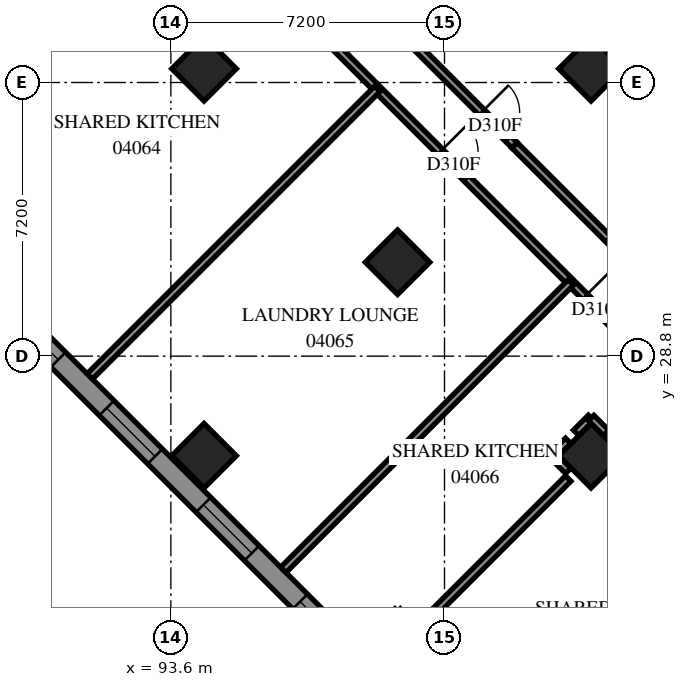
"""IFC4 building model, lengths in metres.
Left out: names, types, materials, properties, quantities, classifications, styles, units other than length and angle.
Written with IfcOpenShell. Run it as: python <this file> out.ifc"""

import sys

from ifc_helpers import new_model, si_unit, direction, frame, frame_2d, origin, origin_2d, place, context, subcontext, project, spatial, polyline, rectangle, outline, extrude, element, fill, save


model = new_model("IFC4")
c1 = context("Model", 3, precision=1e-05, world=origin(), true_north=direction((0.0, 1.0)))
c2 = subcontext(c1, "Body", "Model", "MODEL_VIEW")
j1 = project(units=[si_unit("LENGTHUNIT", "METRE"), si_unit("PLANEANGLEUNIT", "RADIAN")], contexts=[c1])
p1 = place(None, origin())
s1 = spatial("IfcSite", under=j1, at=p1, CompositionType="ELEMENT")
p2 = place(p1, origin())
s2 = spatial("IfcBuilding", under=s1, at=p2, CompositionType="ELEMENT")
p3 = place(p2, frame((0.0, 0.0, 18.6)))
s3 = spatial("IfcBuildingStorey", under=s2, at=p3, CompositionType="ELEMENT", Elevation=18.6)
for number, where, z_axis, x_axis in (
    (1, (94.474, 36.362, 0.0), (0.0, 0.0, 1.0), (0.707, -0.707, 0.0)),
    (2, (104.656, 36.362, 0.0), (0.0, 0.0, 1.0), (0.707, -0.707, 0.0)),
    (3, (99.565, 31.271, 0.0), (0.0, 0.0, 1.0), (0.707, -0.707, 0.0)),
    (4, (94.474, 26.18, 0.0), (0.0, 0.0, 1.0), (0.707, -0.707, 0.0)),
    (5, (104.656, 26.18, 0.0), (0.0, 0.0, 1.0), (0.707, -0.707, 0.0)),
):
    element("IfcColumn", number, at=place(p3, frame(where, z_axis=z_axis, x_axis=x_axis)), inside=s3, PredefinedType="COLUMN", context=c2, shape_type="SweptSolid", body=[
        extrude(rectangle(XDim=1.2, YDim=1.2, at=origin_2d()), origin(), (0.0, 0.0, 1.0), 3.8),
    ])
p4 = place(p3, frame((104.656, 14.689, 0.0), z_axis=(0.0, 0.0, 1.0), x_axis=(0.7071094621, 0.7071041002, 0.0)))
e6 = element("IfcWall", 6, at=p4, inside=s3, PredefinedType="SOLIDWALL", context=c2, shape_type="SweptSolid", body=[
    extrude(outline(polyline([(-0.275, -0.275), (18.925, -0.275), (18.375, 0.275), (0.275, 0.275), (-0.275, -0.275)])), origin(), (0.0, 0.0, 1.0), 3.8),
])
p5 = place(p4, frame((1.825, 0.0, 0.7)))
e7 = element("IfcOpeningElement", 7, at=p5, cuts=e6, PredefinedType="OPENING", context=c2, shape_type="SweptSolid", body=[
    extrude(rectangle(XDim=1.8, YDim=2.4, at=frame_2d((0.9, 1.2))), frame((0.0, 0.285, 0.0), z_axis=(0.0, -1.0, 0.0), x_axis=(1.0, 0.0, 0.0)), (0.0, 0.0, 1.0), 0.57),
])
p6 = place(p4, frame((5.425, 0.0, 0.7)))
e8 = element("IfcOpeningElement", 8, at=p6, cuts=e6, PredefinedType="OPENING", context=c2, shape_type="SweptSolid", body=[
    extrude(rectangle(XDim=1.8, YDim=2.4, at=frame_2d((0.9, 1.2))), frame((0.0, 0.285, 0.0), z_axis=(0.0, -1.0, 0.0), x_axis=(1.0, 0.0, 0.0)), (0.0, 0.0, 1.0), 0.57),
])
p7 = place(p4, frame((9.025, 0.0, 0.7)))
e9 = element("IfcOpeningElement", 9, at=p7, cuts=e6, PredefinedType="OPENING", context=c2, shape_type="SweptSolid", body=[
    extrude(rectangle(XDim=1.8, YDim=2.4, at=frame_2d((0.9, 1.2))), frame((0.0, 0.285, 0.0), z_axis=(0.0, -1.0, 0.0), x_axis=(1.0, 0.0, 0.0)), (0.0, 0.0, 1.0), 0.57),
])
p8 = place(p4, frame((12.625, 0.0, 0.7)))
e10 = element("IfcOpeningElement", 10, at=p8, cuts=e6, PredefinedType="OPENING", context=c2, shape_type="SweptSolid", body=[
    extrude(rectangle(XDim=1.8, YDim=2.4, at=frame_2d((0.9, 1.2))), frame((0.0, 0.285, 0.0), z_axis=(0.0, -1.0, 0.0), x_axis=(1.0, 0.0, 0.0)), (0.0, 0.0, 1.0), 0.57),
])
p9 = place(p4, frame((16.05, 0.0, 0.7)))
e11 = element("IfcOpeningElement", 11, at=p9, cuts=e6, PredefinedType="OPENING", context=c2, shape_type="SweptSolid", body=[
    extrude(rectangle(XDim=1.8, YDim=2.4, at=frame_2d((0.9, 1.2))), frame((0.0, 0.285, 0.0), z_axis=(0.0, -1.0, 0.0), x_axis=(1.0, 0.0, 0.0)), (0.0, 0.0, 1.0), 0.57),
])
p10 = place(p3, frame((117.843, 34.665, 0.0), z_axis=(0.0, 0.0, 1.0), x_axis=(-0.7071067812, 0.7071067812, 0.0)))
e12 = element("IfcWall", 12, at=p10, inside=s3, PredefinedType="SOLIDWALL", context=c2, shape_type="SweptSolid", body=[
    extrude(outline(polyline([(-0.275, -0.275), (54.222, -0.275), (53.994, 0.275), (0.275, 0.275), (-0.275, -0.275)])), origin(), (0.0, 0.0, 1.0), 3.8),
])
p11 = place(p10, frame((0.8, 0.0, 0.7)))
e13 = element("IfcOpeningElement", 13, at=p11, cuts=e12, PredefinedType="OPENING", context=c2, shape_type="SweptSolid", body=[
    extrude(rectangle(XDim=1.8, YDim=2.4, at=frame_2d((0.9, 1.2))), frame((0.0, 0.285, 0.0), z_axis=(0.0, -1.0, 0.0), x_axis=(1.0, 0.0, 0.0)), (0.0, 0.0, 1.0), 0.57),
])
p12 = place(p10, frame((4.225, 0.0, 0.7)))
e14 = element("IfcOpeningElement", 14, at=p12, cuts=e12, PredefinedType="OPENING", context=c2, shape_type="SweptSolid", body=[
    extrude(rectangle(XDim=1.8, YDim=2.4, at=frame_2d((0.9, 1.2))), frame((0.0, 0.285, 0.0), z_axis=(0.0, -1.0, 0.0), x_axis=(1.0, 0.0, 0.0)), (0.0, 0.0, 1.0), 0.57),
])
p13 = place(p10, frame((7.825, 0.0, 0.7)))
e15 = element("IfcOpeningElement", 15, at=p13, cuts=e12, PredefinedType="OPENING", context=c2, shape_type="SweptSolid", body=[
    extrude(rectangle(XDim=1.8, YDim=2.4, at=frame_2d((0.9, 1.2))), frame((0.0, 0.285, 0.0), z_axis=(0.0, -1.0, 0.0), x_axis=(1.0, 0.0, 0.0)), (0.0, 0.0, 1.0), 0.57),
])
p14 = place(p10, frame((11.425, 0.0, 0.7)))
e16 = element("IfcOpeningElement", 16, at=p14, cuts=e12, PredefinedType="OPENING", context=c2, shape_type="SweptSolid", body=[
    extrude(rectangle(XDim=1.8, YDim=2.4, at=frame_2d((0.9, 1.2))), frame((0.0, 0.285, 0.0), z_axis=(0.0, -1.0, 0.0), x_axis=(1.0, 0.0, 0.0)), (0.0, 0.0, 1.0), 0.57),
])
p15 = place(p10, frame((15.025, 0.0, 0.7)))
e17 = element("IfcOpeningElement", 17, at=p15, cuts=e12, PredefinedType="OPENING", context=c2, shape_type="SweptSolid", body=[
    extrude(rectangle(XDim=1.8, YDim=2.4, at=frame_2d((0.9, 1.2))), frame((0.0, 0.285, 0.0), z_axis=(0.0, -1.0, 0.0), x_axis=(1.0, 0.0, 0.0)), (0.0, 0.0, 1.0), 0.57),
])
p16 = place(p10, frame((18.625, 0.0, 0.7)))
e18 = element("IfcOpeningElement", 18, at=p16, cuts=e12, PredefinedType="OPENING", context=c2, shape_type="SweptSolid", body=[
    extrude(rectangle(XDim=1.8, YDim=2.4, at=frame_2d((0.9, 1.2))), frame((0.0, 0.285, 0.0), z_axis=(0.0, -1.0, 0.0), x_axis=(1.0, 0.0, 0.0)), (0.0, 0.0, 1.0), 0.57),
])
p17 = place(p10, frame((22.225, 0.0, 0.7)))
e19 = element("IfcOpeningElement", 19, at=p17, cuts=e12, PredefinedType="OPENING", context=c2, shape_type="SweptSolid", body=[
    extrude(rectangle(XDim=1.8, YDim=2.4, at=frame_2d((0.9, 1.2))), frame((0.0, 0.285, 0.0), z_axis=(0.0, -1.0, 0.0), x_axis=(1.0, 0.0, 0.0)), (0.0, 0.0, 1.0), 0.57),
])
p18 = place(p10, frame((25.825, 0.0, 0.7)))
e20 = element("IfcOpeningElement", 20, at=p18, cuts=e12, PredefinedType="OPENING", context=c2, shape_type="SweptSolid", body=[
    extrude(rectangle(XDim=1.8, YDim=2.4, at=frame_2d((0.9, 1.2))), frame((0.0, 0.285, 0.0), z_axis=(0.0, -1.0, 0.0), x_axis=(1.0, 0.0, 0.0)), (0.0, 0.0, 1.0), 0.57),
])
p19 = place(p10, frame((29.425, 0.0, 0.7)))
e21 = element("IfcOpeningElement", 21, at=p19, cuts=e12, PredefinedType="OPENING", context=c2, shape_type="SweptSolid", body=[
    extrude(rectangle(XDim=1.8, YDim=2.4, at=frame_2d((0.9, 1.2))), frame((0.0, 0.285, 0.0), z_axis=(0.0, -1.0, 0.0), x_axis=(1.0, 0.0, 0.0)), (0.0, 0.0, 1.0), 0.57),
])
p20 = place(p10, frame((33.025, 0.0, 0.7)))
e22 = element("IfcOpeningElement", 22, at=p20, cuts=e12, PredefinedType="OPENING", context=c2, shape_type="SweptSolid", body=[
    extrude(rectangle(XDim=1.8, YDim=2.4, at=frame_2d((0.9, 1.2))), frame((0.0, 0.285, 0.0), z_axis=(0.0, -1.0, 0.0), x_axis=(1.0, 0.0, 0.0)), (0.0, 0.0, 1.0), 0.57),
])
p21 = place(p10, frame((36.625, 0.0, 0.7)))
e23 = element("IfcOpeningElement", 23, at=p21, cuts=e12, PredefinedType="OPENING", context=c2, shape_type="SweptSolid", body=[
    extrude(rectangle(XDim=1.8, YDim=2.4, at=frame_2d((0.9, 1.2))), frame((0.0, 0.285, 0.0), z_axis=(0.0, -1.0, 0.0), x_axis=(1.0, 0.0, 0.0)), (0.0, 0.0, 1.0), 0.57),
])
p22 = place(p10, frame((40.225, 0.0, 0.7)))
e24 = element("IfcOpeningElement", 24, at=p22, cuts=e12, PredefinedType="OPENING", context=c2, shape_type="SweptSolid", body=[
    extrude(rectangle(XDim=1.8, YDim=2.4, at=frame_2d((0.9, 1.2))), frame((0.0, 0.285, 0.0), z_axis=(0.0, -1.0, 0.0), x_axis=(1.0, 0.0, 0.0)), (0.0, 0.0, 1.0), 0.57),
])
p23 = place(p10, frame((43.825, 0.0, 0.7)))
e25 = element("IfcOpeningElement", 25, at=p23, cuts=e12, PredefinedType="OPENING", context=c2, shape_type="SweptSolid", body=[
    extrude(rectangle(XDim=1.8, YDim=2.4, at=frame_2d((0.9, 1.2))), frame((0.0, 0.285, 0.0), z_axis=(0.0, -1.0, 0.0), x_axis=(1.0, 0.0, 0.0)), (0.0, 0.0, 1.0), 0.57),
])
p24 = place(p10, frame((47.425, 0.0, 0.7)))
e26 = element("IfcOpeningElement", 26, at=p24, cuts=e12, PredefinedType="OPENING", context=c2, shape_type="SweptSolid", body=[
    extrude(rectangle(XDim=1.8, YDim=2.4, at=frame_2d((0.9, 1.2))), frame((0.0, 0.285, 0.0), z_axis=(0.0, -1.0, 0.0), x_axis=(1.0, 0.0, 0.0)), (0.0, 0.0, 1.0), 0.57),
])
p25 = place(p10, frame((51.06, 0.0, 0.7)))
e27 = element("IfcOpeningElement", 27, at=p25, cuts=e12, PredefinedType="OPENING", context=c2, shape_type="SweptSolid", body=[
    extrude(rectangle(XDim=1.8, YDim=2.4, at=frame_2d((0.9, 1.2))), frame((0.0, 0.285, 0.0), z_axis=(0.0, -1.0, 0.0), x_axis=(1.0, 0.0, 0.0)), (0.0, 0.0, 1.0), 0.57),
])
p26 = place(p3, frame((77.07, 42.275, 0.0), z_axis=(0.0, 0.0, 1.0), x_axis=(0.7071067812, -0.7071067812, 0.0)))
e28 = element("IfcWall", 28, at=p26, inside=s3, PredefinedType="SOLIDWALL", context=c2, shape_type="SweptSolid", body=[
    extrude(outline(polyline([(0.114, -0.275), (39.288, -0.275), (38.737, 0.275), (-0.114, 0.275), (0.114, -0.275)])), origin(), (0.0, 0.0, 1.0), 3.8),
])
p27 = place(p26, frame((2.837, 0.0, 0.7)))
e29 = element("IfcOpeningElement", 29, at=p27, cuts=e28, PredefinedType="OPENING", context=c2, shape_type="SweptSolid", body=[
    extrude(rectangle(XDim=1.8, YDim=2.4, at=frame_2d((0.9, 1.2))), frame((0.0, 0.285, 0.0), z_axis=(0.0, -1.0, 0.0), x_axis=(1.0, 0.0, 0.0)), (0.0, 0.0, 1.0), 0.57),
])
p28 = place(p26, frame((6.588, 0.0, 0.7)))
e30 = element("IfcOpeningElement", 30, at=p28, cuts=e28, PredefinedType="OPENING", context=c2, shape_type="SweptSolid", body=[
    extrude(rectangle(XDim=1.8, YDim=2.4, at=frame_2d((0.9, 1.2))), frame((0.0, 0.285, 0.0), z_axis=(0.0, -1.0, 0.0), x_axis=(1.0, 0.0, 0.0)), (0.0, 0.0, 1.0), 0.57),
])
p29 = place(p26, frame((10.188, 0.0, 0.7)))
e31 = element("IfcOpeningElement", 31, at=p29, cuts=e28, PredefinedType="OPENING", context=c2, shape_type="SweptSolid", body=[
    extrude(rectangle(XDim=1.8, YDim=2.4, at=frame_2d((0.9, 1.2))), frame((0.0, 0.285, 0.0), z_axis=(0.0, -1.0, 0.0), x_axis=(1.0, 0.0, 0.0)), (0.0, 0.0, 1.0), 0.57),
])
p30 = place(p26, frame((13.787, 0.0, 0.7)))
e32 = element("IfcOpeningElement", 32, at=p30, cuts=e28, PredefinedType="OPENING", context=c2, shape_type="SweptSolid", body=[
    extrude(rectangle(XDim=1.8, YDim=2.4, at=frame_2d((0.9, 1.2))), frame((0.0, 0.285, 0.0), z_axis=(0.0, -1.0, 0.0), x_axis=(1.0, 0.0, 0.0)), (0.0, 0.0, 1.0), 0.57),
])
p31 = place(p26, frame((17.387, 0.0, 0.7)))
e33 = element("IfcOpeningElement", 33, at=p31, cuts=e28, PredefinedType="OPENING", context=c2, shape_type="SweptSolid", body=[
    extrude(rectangle(XDim=1.8, YDim=2.4, at=frame_2d((0.9, 1.2))), frame((0.0, 0.285, 0.0), z_axis=(0.0, -1.0, 0.0), x_axis=(1.0, 0.0, 0.0)), (0.0, 0.0, 1.0), 0.57),
])
p32 = place(p26, frame((20.988, 0.0, 0.7)))
e34 = element("IfcOpeningElement", 34, at=p32, cuts=e28, PredefinedType="OPENING", context=c2, shape_type="SweptSolid", body=[
    extrude(rectangle(XDim=1.8, YDim=2.4, at=frame_2d((0.9, 1.2))), frame((0.0, 0.285, 0.0), z_axis=(0.0, -1.0, 0.0), x_axis=(1.0, 0.0, 0.0)), (0.0, 0.0, 1.0), 0.57),
])
p33 = place(p26, frame((24.587, 0.0, 0.7)))
e35 = element("IfcOpeningElement", 35, at=p33, cuts=e28, PredefinedType="OPENING", context=c2, shape_type="SweptSolid", body=[
    extrude(rectangle(XDim=1.8, YDim=2.4, at=frame_2d((0.9, 1.2))), frame((0.0, 0.285, 0.0), z_axis=(0.0, -1.0, 0.0), x_axis=(1.0, 0.0, 0.0)), (0.0, 0.0, 1.0), 0.57),
])
p34 = place(p26, frame((28.188, 0.0, 0.7)))
e36 = element("IfcOpeningElement", 36, at=p34, cuts=e28, PredefinedType="OPENING", context=c2, shape_type="SweptSolid", body=[
    extrude(rectangle(XDim=1.8, YDim=2.4, at=frame_2d((0.9, 1.2))), frame((0.0, 0.285, 0.0), z_axis=(0.0, -1.0, 0.0), x_axis=(1.0, 0.0, 0.0)), (0.0, 0.0, 1.0), 0.57),
])
p35 = place(p26, frame((31.788, 0.0, 0.7)))
e37 = element("IfcOpeningElement", 37, at=p35, cuts=e28, PredefinedType="OPENING", context=c2, shape_type="SweptSolid", body=[
    extrude(rectangle(XDim=1.8, YDim=2.4, at=frame_2d((0.9, 1.2))), frame((0.0, 0.285, 0.0), z_axis=(0.0, -1.0, 0.0), x_axis=(1.0, 0.0, 0.0)), (0.0, 0.0, 1.0), 0.57),
])
p36 = place(p26, frame((35.388, 0.0, 0.7)))
e38 = element("IfcOpeningElement", 38, at=p36, cuts=e28, PredefinedType="OPENING", context=c2, shape_type="SweptSolid", body=[
    extrude(rectangle(XDim=1.8, YDim=2.4, at=frame_2d((0.9, 1.2))), frame((0.0, 0.285, 0.0), z_axis=(0.0, -1.0, 0.0), x_axis=(1.0, 0.0, 0.0)), (0.0, 0.0, 1.0), 0.57),
])
p37 = place(p3, frame((93.163, 41.697, 0.0), z_axis=(0.0, 0.0, 1.0), x_axis=(0.7071067812, -0.7071067812, 0.0)))
e39 = element("IfcWall", 39, at=p37, inside=s3, PredefinedType="PARTITIONING", context=c2, shape_type="SweptSolid", body=[
    extrude(rectangle(XDim=26.299, YDim=0.2, at=frame_2d((13.149, 0.0))), origin(), (0.0, 0.0, 1.0), 3.8),
])
p38 = place(p37, frame((3.437, 0.0, 0.0)))
e40 = element("IfcOpeningElement", 40, at=p38, cuts=e39, PredefinedType="OPENING", context=c2, shape_type="SweptSolid", body=[
    extrude(rectangle(XDim=1.0, YDim=2.1, at=frame_2d((0.5, 1.05))), frame((0.0, 0.11, 0.0), z_axis=(0.0, -1.0, 0.0), x_axis=(1.0, 0.0, 0.0)), (0.0, 0.0, 1.0), 0.22),
])
p39 = place(p37, frame((10.637, 0.0, 0.0)))
e41 = element("IfcOpeningElement", 41, at=p39, cuts=e39, PredefinedType="OPENING", context=c2, shape_type="SweptSolid", body=[
    extrude(rectangle(XDim=1.0, YDim=2.1, at=frame_2d((0.5, 1.05))), frame((0.0, 0.11, 0.0), z_axis=(0.0, -1.0, 0.0), x_axis=(1.0, 0.0, 0.0)), (0.0, 0.0, 1.0), 0.22),
])
p40 = place(p37, frame((16.024, 0.0, 0.0)))
e42 = element("IfcOpeningElement", 42, at=p40, cuts=e39, PredefinedType="OPENING", context=c2, shape_type="SweptSolid", body=[
    extrude(rectangle(XDim=1.0, YDim=2.1, at=frame_2d((0.5, 1.05))), frame((0.0, 0.11, 0.0), z_axis=(0.0, -1.0, 0.0), x_axis=(1.0, 0.0, 0.0)), (0.0, 0.0, 1.0), 0.22),
])
p41 = place(p37, frame((22.657, 0.0, 0.0)))
e43 = element("IfcOpeningElement", 43, at=p41, cuts=e39, PredefinedType="OPENING", context=c2, shape_type="SweptSolid", body=[
    extrude(rectangle(XDim=1.0, YDim=2.1, at=frame_2d((0.5, 1.05))), frame((0.0, 0.11, 0.0), z_axis=(0.0, -1.0, 0.0), x_axis=(1.0, 0.0, 0.0)), (0.0, 0.0, 1.0), 0.22),
])
p42 = place(p3, frame((110.281, 26.713, 0.0), z_axis=(0.0, 0.0, 1.0), x_axis=(-0.7072363947, 0.7069771439, 0.0)))
e44 = element("IfcWall", 44, at=p42, inside=s3, PredefinedType="PARTITIONING", context=c2, shape_type="SweptSolid", body=[
    extrude(rectangle(XDim=10.8, YDim=0.2, at=frame_2d((5.4, 0.0))), origin(), (0.0, 0.0, 1.0), 3.8),
])
p43 = place(p42, frame((3.827, 0.0, 0.0)))
e45 = element("IfcOpeningElement", 45, at=p43, cuts=e44, PredefinedType="OPENING", context=c2, shape_type="SweptSolid", body=[
    extrude(rectangle(XDim=1.0, YDim=2.1, at=frame_2d((0.5, 1.05))), frame((0.0, 0.11, 0.0), z_axis=(0.0, -1.0, 0.0), x_axis=(1.0, 0.0, 0.0)), (0.0, 0.0, 1.0), 0.22),
])
for number, where, z_axis, x_axis in (
    (46, (96.559, 23.175, 0.0), (0.0, 0.0, 1.0), (0.707, 0.707, 0.0)),
    (47, (86.376, 33.357, 0.0), (0.0, 0.0, 1.0), (0.707, 0.707, 0.0)),
):
    element("IfcWall", number, at=place(p3, frame(where, z_axis=z_axis, x_axis=x_axis)), inside=s3, PredefinedType="PARTITIONING", context=c2, shape_type="SweptSolid", body=[
        extrude(rectangle(XDim=10.7, YDim=0.2, at=frame_2d((5.35, 0.0))), origin(), (0.0, 0.0, 1.0), 3.8),
    ])
p44 = place(p3, frame((91.468, 28.266, 0.0), z_axis=(0.0, 0.0, 1.0), x_axis=(0.7071067812, 0.7071067812, 0.0)))
e48 = element("IfcWall", 48, at=p44, inside=s3, PredefinedType="PARTITIONING", context=c2, shape_type="SweptSolid", body=[
    extrude(rectangle(XDim=10.7, YDim=0.2, at=frame_2d((5.35, 0.0))), origin(), (0.0, 0.0, 1.0), 3.8),
])
p45 = place(p3, frame((86.836, 35.372, 0.0), z_axis=(0.0, 0.0, 1.0), x_axis=(0.7071067812, 0.7071067812, 0.0)))
e49 = element("IfcWall", 49, at=p45, inside=s3, PredefinedType="PARTITIONING", context=c2, shape_type="SweptSolid", body=[
    extrude(rectangle(XDim=8.949, YDim=0.2, at=frame_2d((4.474, 0.0))), origin(), (0.0, 0.0, 1.0), 3.8),
])
p46 = place(p45, frame((7.8, 0.0, 0.0)))
e50 = element("IfcOpeningElement", 50, at=p46, cuts=e49, PredefinedType="OPENING", context=c2, shape_type="SweptSolid", body=[
    extrude(rectangle(XDim=1.0, YDim=2.1, at=frame_2d((0.5, 1.05))), frame((0.0, 0.11, 0.0), z_axis=(0.0, -1.0, 0.0), x_axis=(1.0, 0.0, 0.0)), (0.0, 0.0, 1.0), 0.22),
])
p47 = place(p3, frame((94.371, 42.623, 0.0), z_axis=(0.0, 0.0, 1.0), x_axis=(0.7071067812, -0.7071067812, 0.0)))
e51 = element("IfcWall", 51, at=p47, inside=s3, PredefinedType="PARTITIONING", context=c2, shape_type="SweptSolid", body=[
    extrude(outline(polyline([(0.0, -0.1), (11.7, -0.1), (11.7, 0.1), (0.0, 0.1), (0.0, -0.1)])), origin(), (0.0, 0.0, 1.0), 3.8),
])
p48 = place(p47, frame((3.274, 0.0, 0.0)))
e52 = element("IfcOpeningElement", 52, at=p48, cuts=e51, PredefinedType="OPENING", context=c2, shape_type="SweptSolid", body=[
    extrude(rectangle(XDim=1.0, YDim=2.1, at=frame_2d((0.5, 1.05))), frame((0.0, 0.11, 0.0), z_axis=(0.0, -1.0, 0.0), x_axis=(1.0, 0.0, 0.0)), (0.0, 0.0, 1.0), 0.22),
])
p49 = place(p47, frame((10.473, 0.0, 0.0)))
e53 = element("IfcOpeningElement", 53, at=p49, cuts=e51, PredefinedType="OPENING", context=c2, shape_type="SweptSolid", body=[
    extrude(rectangle(XDim=1.0, YDim=2.1, at=frame_2d((0.5, 1.05))), frame((0.0, 0.11, 0.0), z_axis=(0.0, -1.0, 0.0), x_axis=(1.0, 0.0, 0.0)), (0.0, 0.0, 1.0), 0.22),
])
p50 = place(p3, frame((100.163, 21.689, 0.0), z_axis=(0.0, 0.0, 1.0), x_axis=(0.7071067812, 0.7071067812, 0.0)))
e54 = element("IfcWall", 54, at=p50, inside=s3, PredefinedType="PARTITIONING", context=c2, shape_type="SweptSolid", body=[
    extrude(rectangle(XDim=5.504, YDim=0.2, at=frame_2d((2.752, 0.0))), origin(), (0.0, 0.0, 1.0), 3.8),
])
for number, where, z_axis, x_axis in (
    (55, (103.661, 26.177, 0.0), (0.0, 0.0, 1.0), (0.707, 0.707, 0.0)),
    (56, (103.662, 26.177, 0.0), (0.0, 0.0, 1.0), (0.707, -0.707, 0.0)),
):
    element("IfcWall", number, at=place(p3, frame(where, z_axis=z_axis, x_axis=x_axis)), inside=s3, PredefinedType="PARTITIONING", context=c2, shape_type="SweptSolid", body=[
        extrude(rectangle(XDim=0.557, YDim=0.2, at=frame_2d((0.279, 0.0))), origin(), (0.0, 0.0, 1.0), 3.8),
    ])
p51 = place(p3, frame((104.263, 26.784, 0.0), z_axis=(0.0, 0.0, 1.0), x_axis=(0.7089037401, 0.705305244, 0.0)))
e57 = element("IfcWall", 57, at=p51, inside=s3, PredefinedType="PARTITIONING", context=c2, shape_type="SweptSolid", body=[
    extrude(rectangle(XDim=0.556, YDim=0.2, at=frame_2d((0.278, 0.0))), origin(), (0.0, 0.0, 1.0), 3.8),
])
p52 = place(p3, frame((104.66, 27.172, 0.0), z_axis=(0.0, 0.0, 1.0), x_axis=(0.7071067812, -0.7071067812, 0.0)))
e58 = element("IfcWall", 58, at=p52, inside=s3, PredefinedType="PARTITIONING", context=c2, shape_type="SweptSolid", body=[
    extrude(rectangle(XDim=0.554, YDim=0.2, at=frame_2d((0.277, 0.0))), origin(), (0.0, 0.0, 1.0), 3.8),
])
p53 = place(p31, origin())
e59 = element("IfcWindow", 59, at=p53, inside=s3, PartitioningType="SINGLE_PANEL", PredefinedType="WINDOW", context=c2, shape_type="SweptSolid", body=[
    extrude(rectangle(XDim=1.8, YDim=2.4, at=frame_2d((0.9, 1.2))), frame((0.0, 0.155, 0.0), z_axis=(0.0, -1.0, 0.0), x_axis=(1.0, 0.0, 0.0)), (0.0, 0.0, 1.0), 0.06),
])
fill(e33, e59)
p54 = place(p32, origin())
e60 = element("IfcWindow", 60, at=p54, inside=s3, PartitioningType="SINGLE_PANEL", PredefinedType="WINDOW", context=c2, shape_type="SweptSolid", body=[
    extrude(rectangle(XDim=1.8, YDim=2.4, at=frame_2d((0.9, 1.2))), frame((0.0, 0.155, 0.0), z_axis=(0.0, -1.0, 0.0), x_axis=(1.0, 0.0, 0.0)), (0.0, 0.0, 1.0), 0.06),
])
fill(e34, e60)
p55 = place(p33, origin())
e61 = element("IfcWindow", 61, at=p55, inside=s3, PartitioningType="SINGLE_PANEL", PredefinedType="WINDOW", context=c2, shape_type="SweptSolid", body=[
    extrude(rectangle(XDim=1.8, YDim=2.4, at=frame_2d((0.9, 1.2))), frame((0.0, 0.155, 0.0), z_axis=(0.0, -1.0, 0.0), x_axis=(1.0, 0.0, 0.0)), (0.0, 0.0, 1.0), 0.06),
])
fill(e35, e61)
p56 = place(p34, origin())
e62 = element("IfcWindow", 62, at=p56, inside=s3, PartitioningType="SINGLE_PANEL", PredefinedType="WINDOW", context=c2, shape_type="SweptSolid", body=[
    extrude(rectangle(XDim=1.8, YDim=2.4, at=frame_2d((0.9, 1.2))), frame((0.0, 0.155, 0.0), z_axis=(0.0, -1.0, 0.0), x_axis=(1.0, 0.0, 0.0)), (0.0, 0.0, 1.0), 0.06),
])
fill(e36, e62)
p57 = place(p49, origin())
e63 = element("IfcDoor", 63, at=p57, inside=s3, OperationType="SINGLE_SWING_RIGHT", PredefinedType="DOOR", context=c2, shape_type="SweptSolid", body=[
    extrude(rectangle(XDim=1.0, YDim=2.1, at=frame_2d((0.5, 1.05))), frame((0.0, 0.025, 0.0), z_axis=(0.0, -1.0, 0.0), x_axis=(1.0, 0.0, 0.0)), (0.0, 0.0, 1.0), 0.05),
])
fill(e53, e63)
p58 = place(p39, origin())
e64 = element("IfcDoor", 64, at=p58, inside=s3, OperationType="SINGLE_SWING_LEFT", PredefinedType="DOOR", context=c2, shape_type="SweptSolid", body=[
    extrude(rectangle(XDim=1.0, YDim=2.1, at=frame_2d((0.5, 1.05))), frame((0.0, 0.025, 0.0), z_axis=(0.0, -1.0, 0.0), x_axis=(1.0, 0.0, 0.0)), (0.0, 0.0, 1.0), 0.05),
])
fill(e41, e64)
p59 = place(p40, origin())
e65 = element("IfcDoor", 65, at=p59, inside=s3, OperationType="SINGLE_SWING_LEFT", PredefinedType="DOOR", context=c2, shape_type="SweptSolid", body=[
    extrude(rectangle(XDim=1.0, YDim=2.1, at=frame_2d((0.5, 1.05))), frame((0.0, 0.025, 0.0), z_axis=(0.0, -1.0, 0.0), x_axis=(1.0, 0.0, 0.0)), (0.0, 0.0, 1.0), 0.05),
])
fill(e42, e65)
save(model, sys.argv[1])
